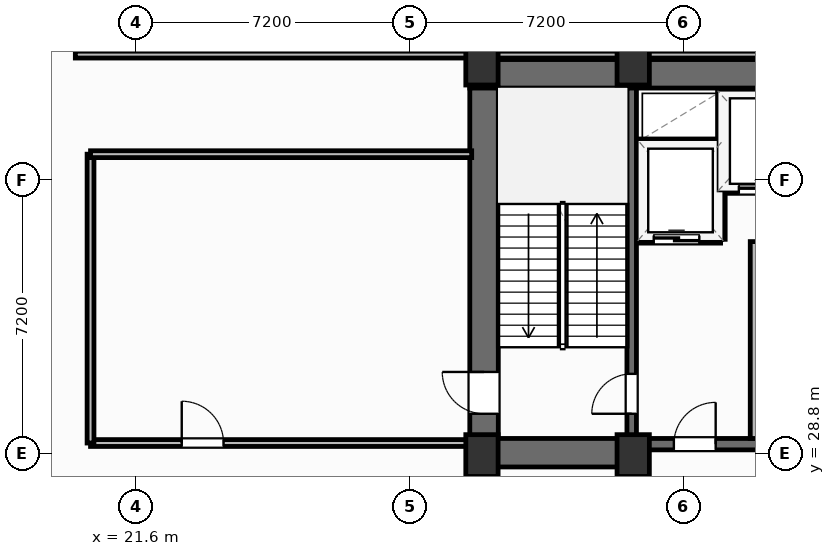
"""IFC4 building model, lengths in metres.
Left out: names, types, materials, properties, quantities, classifications, styles, units other than length and angle.
Written with IfcOpenShell. Run it as: python <this file> out.ifc"""

import sys

from ifc_helpers import new_model, si_unit, direction, frame, frame_2d, origin, origin_2d, place, context, subcontext, project, spatial, rectangle, extrude, element, fill, save


model = new_model("IFC4")
c1 = context("Model", 3, precision=1e-05, world=origin(), true_north=direction((0.0, 1.0)))
c2 = subcontext(c1, "Body", "Model", "MODEL_VIEW")
j1 = project(units=[si_unit("LENGTHUNIT", "METRE"), si_unit("PLANEANGLEUNIT", "RADIAN")], contexts=[c1])
p1 = place(None, origin())
s1 = spatial("IfcSite", under=j1, at=p1, CompositionType="ELEMENT")
p2 = place(p1, origin())
s2 = spatial("IfcBuilding", under=s1, at=p2, CompositionType="ELEMENT")
p3 = place(p2, frame((0.0, 0.0, 162.4)))
s3 = spatial("IfcBuildingStorey", under=s2, at=p3, CompositionType="ELEMENT", Elevation=162.4)
for number, where, z_axis, x_axis in (
    (1, (30.7, 28.75, 0.0), (0.0, 0.0, 1.0), (1.0, 0.0, 0.0)),
    (2, (34.68, 28.75, 0.0), (0.0, 0.0, 1.0), (1.0, 0.0, 0.0)),
    (3, (30.7, 39.05, 0.0), (0.0, 0.0, 1.0), (1.0, 0.0, 0.0)),
    (4, (34.68, 39.05, 0.0), (0.0, 0.0, 1.0), (1.0, 0.0, 0.0)),
):
    element("IfcColumn", number, at=place(p3, frame(where, z_axis=z_axis, x_axis=x_axis)), inside=s3, PredefinedType="COLUMN", context=c2, shape_type="SweptSolid", body=[
        extrude(rectangle(XDim=0.85, YDim=1.1, at=origin_2d()), origin(), (0.0, 0.0, 1.0), 4.8),
    ])
p4 = place(p3, frame((30.38, 38.795, 0.0), z_axis=(0.0, 0.0, 1.0), x_axis=(1.0, 0.0, 0.0)))
e5 = element("IfcWall", 5, at=p4, inside=s3, PredefinedType="SHEAR", context=c2, shape_type="SweptSolid", body=[
    extrude(rectangle(XDim=17.64, YDim=0.75, at=frame_2d((8.82, 0.0))), origin(), (0.0, 0.0, 1.0), 4.55),
])
p5 = place(p3, frame((30.755, 29.2, 0.0), z_axis=(0.0, 0.0, 1.0), x_axis=(0.0, 1.0, 0.0)))
e6 = element("IfcWall", 6, at=p5, inside=s3, PredefinedType="SHEAR", context=c2, shape_type="SweptSolid", body=[
    extrude(rectangle(XDim=9.22, YDim=0.75, at=frame_2d((4.61, 0.0))), origin(), (0.0, 0.0, 1.0), 4.55),
])
p6 = place(p5, frame((0.65, 0.0, 0.0)))
e7 = element("IfcOpeningElement", 7, at=p6, cuts=e6, PredefinedType="OPENING", context=c2, shape_type="SweptSolid", body=[
    extrude(rectangle(XDim=1.1, YDim=2.15, at=frame_2d((0.55, 1.075))), frame((0.0, 0.385, 0.0), z_axis=(0.0, -1.0, 0.0), x_axis=(1.0, 0.0, 0.0)), (0.0, 0.0, 1.0), 0.77),
])
p7 = place(p3, frame((30.38, 28.825, 0.0), z_axis=(0.0, 0.0, 1.0), x_axis=(1.0, 0.0, 0.0)))
e8 = element("IfcWall", 8, at=p7, inside=s3, PredefinedType="SHEAR", context=c2, shape_type="SweptSolid", body=[
    extrude(rectangle(XDim=4.42, YDim=0.75, at=frame_2d((2.21, 0.0))), origin(), (0.0, 0.0, 1.0), 4.55),
])
p8 = place(p3, frame((34.8, 29.05, 0.0), z_axis=(0.0, 0.0, 1.0), x_axis=(1.0, 0.0, 0.0)))
e9 = element("IfcWall", 9, at=p8, inside=s3, PredefinedType="SHEAR", context=c2, shape_type="SweptSolid", body=[
    extrude(rectangle(XDim=8.8, YDim=0.3, at=frame_2d((4.4, 0.0))), origin(), (0.0, 0.0, 1.0), 4.55),
])
p9 = place(p8, frame((0.95, 0.0, 0.0)))
e10 = element("IfcOpeningElement", 10, at=p9, cuts=e9, PredefinedType="OPENING", context=c2, shape_type="SweptSolid", body=[
    extrude(rectangle(XDim=1.1, YDim=2.15, at=frame_2d((0.55, 1.075))), frame((0.0, 0.16, 0.0), z_axis=(0.0, -1.0, 0.0), x_axis=(1.0, 0.0, 0.0)), (0.0, 0.0, 1.0), 0.32),
])
p10 = place(p8, frame((6.75, 0.0, 0.0)))
e11 = element("IfcOpeningElement", 11, at=p10, cuts=e9, PredefinedType="OPENING", context=c2, shape_type="SweptSolid", body=[
    extrude(rectangle(XDim=1.1, YDim=2.15, at=frame_2d((0.55, 1.075))), frame((0.0, 0.16, 0.0), z_axis=(0.0, -1.0, 0.0), x_axis=(1.0, 0.0, 0.0)), (0.0, 0.0, 1.0), 0.32),
])
p11 = place(p8, frame((4.45, 0.0, 0.0)))
e12 = element("IfcOpeningElement", 12, at=p11, cuts=e9, PredefinedType="OPENING", context=c2, shape_type="SweptSolid", body=[
    extrude(rectangle(XDim=0.95, YDim=2.15, at=frame_2d((0.475, 1.075))), frame((0.0, 0.16, 0.0), z_axis=(0.0, -1.0, 0.0), x_axis=(1.0, 0.0, 0.0)), (0.0, 0.0, 1.0), 0.32),
])
p12 = place(p3, frame((34.64, 29.2, 0.0), z_axis=(0.0, 0.0, 1.0), x_axis=(0.0, 1.0, 0.0)))
e13 = element("IfcWall", 13, at=p12, inside=s3, PredefinedType="SHEAR", context=c2, shape_type="SweptSolid", body=[
    extrude(rectangle(XDim=9.22, YDim=0.25, at=frame_2d((4.61, 0.0))), origin(), (0.0, 0.0, 1.0), 4.55),
])
p13 = place(p12, frame((0.65, 0.0, 0.0)))
e14 = element("IfcOpeningElement", 14, at=p13, cuts=e13, PredefinedType="OPENING", context=c2, shape_type="SweptSolid", body=[
    extrude(rectangle(XDim=1.05, YDim=2.15, at=frame_2d((0.525, 1.075))), frame((0.0, 0.135, 0.0), z_axis=(0.0, -1.0, 0.0), x_axis=(1.0, 0.0, 0.0)), (0.0, 0.0, 1.0), 0.27),
])
p14 = place(p3, frame((20.4, 29.08, 0.0), z_axis=(0.0, 0.0, 1.0), x_axis=(1.0, 0.0, 0.0)))
e15 = element("IfcWall", 15, at=p14, inside=s3, PredefinedType="PARTITIONING", context=c2, shape_type="SweptSolid", body=[
    extrude(rectangle(XDim=9.95, YDim=0.18, at=frame_2d((4.975, 0.0))), origin(), (0.0, 0.0, 1.0), 4.55),
])
p15 = place(p14, frame((2.4, 0.0, 0.0)))
e16 = element("IfcOpeningElement", 16, at=p15, cuts=e15, PredefinedType="OPENING", context=c2, shape_type="SweptSolid", body=[
    extrude(rectangle(XDim=1.1, YDim=2.15, at=frame_2d((0.55, 1.075))), frame((0.0, 0.1, 0.0), z_axis=(0.0, -1.0, 0.0), x_axis=(1.0, 0.0, 0.0)), (0.0, 0.0, 1.0), 0.2),
])
p16 = place(p3, frame((20.4, 29.08, 0.0), z_axis=(0.0, 0.0, 1.0), x_axis=(0.0, 1.0, 0.0)))
e17 = element("IfcWall", 17, at=p16, inside=s3, PredefinedType="PARTITIONING", context=c2, shape_type="SweptSolid", body=[
    extrude(rectangle(XDim=7.6, YDim=0.18, at=frame_2d((3.8, 0.0))), origin(), (0.0, 0.0, 1.0), 4.55),
])
p17 = place(p3, frame((20.4, 36.68, 0.0), z_axis=(0.0, 0.0, 1.0), x_axis=(1.0, 0.0, 0.0)))
e18 = element("IfcWall", 18, at=p17, inside=s3, PredefinedType="PARTITIONING", context=c2, shape_type="SweptSolid", body=[
    extrude(rectangle(XDim=10.03, YDim=0.18, at=frame_2d((5.015, 0.0))), origin(), (0.0, 0.0, 1.0), 4.55),
])
p18 = place(p3, frame((20.0, 39.3, 0.0), z_axis=(0.0, 0.0, 1.0), x_axis=(1.0, 0.0, 0.0)))
e19 = element("IfcWall", 19, at=p18, inside=s3, PredefinedType="PARTITIONING", context=c2, shape_type="SweptSolid", body=[
    extrude(rectangle(XDim=33.3, YDim=0.18, at=frame_2d((16.65, 0.0))), origin(), (0.0, 0.0, 1.0), 3.762),
])
p19 = place(p18, frame((31.1, 0.0, 0.0)))
e20 = element("IfcOpeningElement", 20, at=p19, cuts=e19, PredefinedType="OPENING", context=c2, shape_type="SweptSolid", body=[
    extrude(rectangle(XDim=1.0, YDim=2.05, at=frame_2d((0.5, 1.025))), frame((0.0, 0.1, 0.0), z_axis=(0.0, -1.0, 0.0), x_axis=(1.0, 0.0, 0.0)), (0.0, 0.0, 1.0), 0.2),
])
p20 = place(p3, frame((37.86, 29.2, 0.0), z_axis=(0.0, 0.0, 1.0), x_axis=(0.0, 1.0, 0.0)))
e21 = element("IfcWall", 21, at=p20, inside=s3, PredefinedType="PARTITIONING", context=c2, shape_type="SweptSolid", body=[
    extrude(rectangle(XDim=5.18, YDim=0.2, at=frame_2d((2.59, 0.0))), origin(), (0.0, 0.0, 1.0), 4.55),
])
p21 = place(p3, frame((34.8, 34.44, 0.0), z_axis=(0.0, 0.0, 1.0), x_axis=(1.0, 0.0, 0.0)))
e22 = element("IfcWall", 22, at=p21, inside=s3, PredefinedType="PARTITIONING", context=c2, shape_type="SweptSolid", body=[
    extrude(rectangle(XDim=2.18, YDim=0.2, at=frame_2d((1.09, 0.0))), origin(), (0.0, 0.0, 1.0), 4.55),
])
p22 = place(p21, frame((0.42, 0.0, 0.0)))
e23 = element("IfcOpeningElement", 23, at=p22, cuts=e22, PredefinedType="OPENING", context=c2, shape_type="SweptSolid", body=[
    extrude(rectangle(XDim=1.2, YDim=2.2, at=frame_2d((0.6, 1.1))), frame((0.0, 0.11, 0.0), z_axis=(0.0, -1.0, 0.0), x_axis=(1.0, 0.0, 0.0)), (0.0, 0.0, 1.0), 0.22),
])
p23 = place(p3, frame((34.8, 36.98, 0.0), z_axis=(0.0, 0.0, 1.0), x_axis=(1.0, 0.0, 0.0)))
e24 = element("IfcWall", 24, at=p23, inside=s3, PredefinedType="PARTITIONING", context=c2, shape_type="SweptSolid", body=[
    extrude(rectangle(XDim=2.18, YDim=0.2, at=frame_2d((1.09, 0.0))), origin(), (0.0, 0.0, 1.0), 4.55),
])
p24 = place(p3, frame((37.0, 34.44, 0.0), z_axis=(0.0, 0.0, 1.0), x_axis=(0.0, 1.0, 0.0)))
e25 = element("IfcWall", 25, at=p24, inside=s3, PredefinedType="PARTITIONING", context=c2, shape_type="SweptSolid", body=[
    extrude(rectangle(XDim=3.9, YDim=0.2, at=frame_2d((1.95, 0.0))), origin(), (0.0, 0.0, 1.0), 4.55),
])
p25 = place(p3, frame((37.06, 35.75, 0.0), z_axis=(0.0, 0.0, 1.0), x_axis=(1.0, 0.0, 0.0)))
e26 = element("IfcWall", 26, at=p25, inside=s3, PredefinedType="PARTITIONING", context=c2, shape_type="SweptSolid", body=[
    extrude(rectangle(XDim=2.12, YDim=0.2, at=frame_2d((1.06, 0.0))), origin(), (0.0, 0.0, 1.0), 4.55),
])
p26 = place(p25, frame((0.4, 0.0, 0.0)))
e27 = element("IfcOpeningElement", 27, at=p26, cuts=e26, PredefinedType="OPENING", context=c2, shape_type="SweptSolid", body=[
    extrude(rectangle(XDim=1.3, YDim=2.2, at=frame_2d((0.65, 1.1))), frame((0.0, 0.11, 0.0), z_axis=(0.0, -1.0, 0.0), x_axis=(1.0, 0.0, 0.0)), (0.0, 0.0, 1.0), 0.22),
])
p27 = place(p6, origin())
e28 = element("IfcDoor", 28, at=p27, inside=s3, OperationType="SINGLE_SWING_RIGHT", PredefinedType="DOOR", context=c2, shape_type="SweptSolid", body=[
    extrude(rectangle(XDim=1.1, YDim=2.15, at=frame_2d((0.55, 1.075))), frame((0.0, 0.025, 0.0), z_axis=(0.0, -1.0, 0.0), x_axis=(1.0, 0.0, 0.0)), (0.0, 0.0, 1.0), 0.05),
])
fill(e7, e28)
p28 = place(p15, origin())
e29 = element("IfcDoor", 29, at=p28, inside=s3, OperationType="SINGLE_SWING_LEFT", PredefinedType="DOOR", context=c2, shape_type="SweptSolid", body=[
    extrude(rectangle(XDim=1.1, YDim=2.15, at=frame_2d((0.55, 1.075))), frame((0.0, 0.025, 0.0), z_axis=(0.0, -1.0, 0.0), x_axis=(1.0, 0.0, 0.0)), (0.0, 0.0, 1.0), 0.05),
])
fill(e16, e29)
p29 = place(p13, origin())
e30 = element("IfcDoor", 30, at=p29, inside=s3, OperationType="SINGLE_SWING_LEFT", PredefinedType="DOOR", context=c2, shape_type="SweptSolid", body=[
    extrude(rectangle(XDim=1.05, YDim=2.15, at=frame_2d((0.525, 1.075))), frame((0.0, 0.025, 0.0), z_axis=(0.0, -1.0, 0.0), x_axis=(1.0, 0.0, 0.0)), (0.0, 0.0, 1.0), 0.05),
])
fill(e14, e30)
p30 = place(p9, origin())
e31 = element("IfcDoor", 31, at=p30, inside=s3, OperationType="SINGLE_SWING_RIGHT", PredefinedType="DOOR", context=c2, shape_type="SweptSolid", body=[
    extrude(rectangle(XDim=1.1, YDim=2.15, at=frame_2d((0.55, 1.075))), frame((0.0, 0.025, 0.0), z_axis=(0.0, -1.0, 0.0), x_axis=(1.0, 0.0, 0.0)), (0.0, 0.0, 1.0), 0.05),
])
fill(e10, e31)
p31 = place(p22, origin())
e32 = element("IfcDoor", 32, at=p31, inside=s3, OperationType="SLIDING_TO_LEFT", PredefinedType="DOOR", context=c2, shape_type="SweptSolid", body=[
    extrude(rectangle(XDim=1.2, YDim=2.2, at=frame_2d((0.6, 1.1))), frame((0.0, 0.025, 0.0), z_axis=(0.0, -1.0, 0.0), x_axis=(1.0, 0.0, 0.0)), (0.0, 0.0, 1.0), 0.05),
])
fill(e23, e32)
p32 = place(p26, origin())
e33 = element("IfcDoor", 33, at=p32, inside=s3, OperationType="SLIDING_TO_LEFT", PredefinedType="DOOR", context=c2, shape_type="SweptSolid", body=[
    extrude(rectangle(XDim=1.3, YDim=2.2, at=frame_2d((0.65, 1.1))), frame((0.0, 0.025, 0.0), z_axis=(0.0, -1.0, 0.0), x_axis=(1.0, 0.0, 0.0)), (0.0, 0.0, 1.0), 0.05),
])
fill(e27, e33)
save(model, sys.argv[1])
